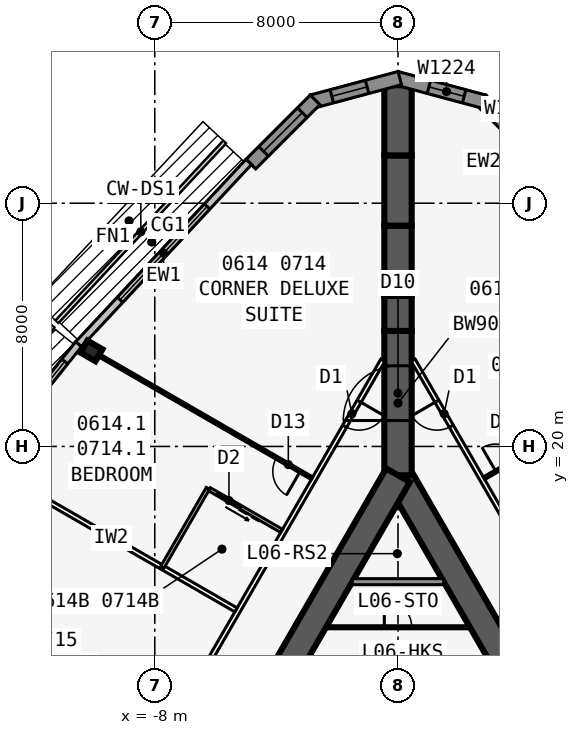
"""IFC4 building model, lengths in metres.
Left out: names, types, materials, properties, quantities, classifications, styles, units other than length and angle.
Written with IfcOpenShell. Run it as: python <this file> out.ifc"""

import sys

from ifc_helpers import new_model, si_unit, direction, frame, frame_2d, origin, origin_2d, place, context, subcontext, project, spatial, polyline, rectangle, i_section, outline, extrude, element, fill, save


model = new_model("IFC4")
c1 = context("Model", 3, precision=1e-05, world=origin(), true_north=direction((0.0, 1.0)))
c2 = subcontext(c1, "Body", "Model", "MODEL_VIEW")
j1 = project(units=[si_unit("LENGTHUNIT", "METRE"), si_unit("PLANEANGLEUNIT", "RADIAN")], contexts=[c1])
p1 = place(None, origin())
s1 = spatial("IfcSite", under=j1, at=p1, CompositionType="ELEMENT")
p2 = place(p1, origin())
s2 = spatial("IfcBuilding", under=s1, at=p2, CompositionType="ELEMENT")
p3 = place(p2, frame((0.0, 0.0, 31.9)))
s3 = spatial("IfcBuildingStorey", under=s2, at=p3, CompositionType="ELEMENT", Elevation=31.9)
p4 = place(p3, frame((16.5, -9.526, 0.0), z_axis=(0.0, 0.0, 1.0), x_axis=(-0.499999749417, 0.866025548458, 0.0)))
e1 = element("IfcWall", 1, at=p4, inside=s3, PredefinedType="SHEAR", context=c2, shape_type="SweptSolid", body=[
    extrude(rectangle(XDim=33.0, YDim=0.9, at=frame_2d((16.5, 0.0))), origin(), (0.0, 0.0, 1.0), 3.4),
])
p5 = place(p4, frame((14.15, 0.0, 0.0)))
e2 = element("IfcOpeningElement", 2, at=p5, cuts=e1, PredefinedType="OPENING", context=c2, shape_type="SweptSolid", body=[
    extrude(rectangle(XDim=1.8, YDim=2.13, at=frame_2d((0.9, 1.065))), frame((0.0, 0.46, 0.0), z_axis=(0.0, -1.0, 0.0), x_axis=(1.0, 0.0, 0.0)), (0.0, 0.0, 1.0), 0.92),
])
p6 = place(p4, frame((12.6, 0.0, 0.0)))
e3 = element("IfcOpeningElement", 3, at=p6, cuts=e1, PredefinedType="OPENING", context=c2, shape_type="SweptSolid", body=[
    extrude(rectangle(XDim=1.0, YDim=2.13, at=frame_2d((0.5, 1.065))), frame((0.0, 0.46, 0.0), z_axis=(0.0, -1.0, 0.0), x_axis=(1.0, 0.0, 0.0)), (0.0, 0.0, 1.0), 0.92),
])
p7 = place(p3, frame((0.0, 19.052, 0.0), z_axis=(0.0, 0.0, 1.0), x_axis=(-0.499999749417, -0.866025548458, 0.0)))
e4 = element("IfcWall", 4, at=p7, inside=s3, PredefinedType="SHEAR", context=c2, shape_type="SweptSolid", body=[
    extrude(rectangle(XDim=33.0, YDim=0.9, at=frame_2d((16.5, 0.0))), origin(), (0.0, 0.0, 1.0), 3.4),
])
p8 = place(p7, frame((14.15, 0.0, 0.0)))
e5 = element("IfcOpeningElement", 5, at=p8, cuts=e4, PredefinedType="OPENING", context=c2, shape_type="SweptSolid", body=[
    extrude(rectangle(XDim=1.8, YDim=2.13, at=frame_2d((0.9, 1.065))), frame((0.0, 0.46, 0.0), z_axis=(0.0, -1.0, 0.0), x_axis=(1.0, 0.0, 0.0)), (0.0, 0.0, 1.0), 0.92),
])
p9 = place(p7, frame((12.6, 0.0, 0.0)))
e6 = element("IfcOpeningElement", 6, at=p9, cuts=e4, PredefinedType="OPENING", context=c2, shape_type="SweptSolid", body=[
    extrude(rectangle(XDim=1.0, YDim=2.13, at=frame_2d((0.5, 1.065))), frame((0.0, 0.46, 0.0), z_axis=(0.0, -1.0, 0.0), x_axis=(1.0, 0.0, 0.0)), (0.0, 0.0, 1.0), 0.92),
])
p10 = place(p3, frame((0.0, 19.052, 0.0), z_axis=(0.0, 0.0, 1.0), x_axis=(0.0, 1.0, 0.0)))
e7 = element("IfcWall", 7, at=p10, inside=s3, PredefinedType="SHEAR", context=c2, shape_type="SweptSolid", body=[
    extrude(rectangle(XDim=4.746, YDim=0.9, at=frame_2d((2.373, 0.0))), origin(), (0.0, 0.0, 1.0), 3.4),
])
p11 = place(p10, frame((1.8, 0.0, 0.0)))
e8 = element("IfcOpeningElement", 8, at=p11, cuts=e7, PredefinedType="OPENING", context=c2, shape_type="SweptSolid", body=[
    extrude(rectangle(XDim=1.8, YDim=2.13, at=frame_2d((0.9, 1.065))), frame((0.0, 0.46, 0.0), z_axis=(0.0, -1.0, 0.0), x_axis=(1.0, 0.0, 0.0)), (0.0, 0.0, 1.0), 0.92),
])
p12 = place(p3, frame((0.0, 23.799, 0.0), z_axis=(0.0, 0.0, 1.0), x_axis=(0.0, 1.0, 0.0)))
e9 = element("IfcWall", 9, at=p12, inside=s3, PredefinedType="SHEAR", context=c2, shape_type="SweptSolid", body=[
    extrude(rectangle(XDim=1.155, YDim=0.9, at=frame_2d((0.577, 0.0))), origin(), (0.0, 0.0, 1.0), 3.4),
])
p13 = place(p3, frame((0.0, 24.953, 0.0), z_axis=(0.0, 0.0, 1.0), x_axis=(0.0, 1.0, 0.0)))
e10 = element("IfcWall", 10, at=p13, inside=s3, PredefinedType="SHEAR", context=c2, shape_type="SweptSolid", body=[
    extrude(rectangle(XDim=2.309, YDim=0.9, at=frame_2d((1.155, 0.0))), origin(), (0.0, 0.0, 1.0), 3.4),
])
p14 = place(p3, frame((0.0, 27.263, 0.0), z_axis=(0.0, 0.0, 1.0), x_axis=(0.0, 1.0, 0.0)))
e11 = element("IfcWall", 11, at=p14, inside=s3, PredefinedType="SHEAR", context=c2, shape_type="SweptSolid", body=[
    extrude(rectangle(XDim=2.31, YDim=0.9, at=frame_2d((1.155, 0.0))), origin(), (0.0, 0.0, 1.0), 3.4),
])
p15 = place(p3, frame((0.0, 29.572, 0.0), z_axis=(0.0, 0.0, 1.0), x_axis=(0.0, 1.0, 0.0)))
e12 = element("IfcWall", 12, at=p15, inside=s3, PredefinedType="SHEAR", context=c2, shape_type="SweptSolid", body=[
    extrude(rectangle(XDim=2.309, YDim=0.9, at=frame_2d((1.155, 0.0))), origin(), (0.0, 0.0, 1.0), 3.4),
])
p16 = place(p3, frame((-10.083, 23.142, 0.0), z_axis=(0.0, 0.0, 1.0), x_axis=(-0.5, -0.866025403784, 0.0)))
e13 = element("IfcColumn", 13, at=p16, inside=s3, PredefinedType="COLUMN", context=c2, shape_type="SweptSolid", body=[
    extrude(i_section(OverallWidth=0.455, OverallDepth=0.569, WebThickness=0.078, FlangeThickness=0.125, at=origin_2d()), origin(), (0.0, 0.0, 1.0), 3.4),
])
p17 = place(p3, frame((4.841, 29.286, 0.0), z_axis=(0.0, 0.0, 1.0), x_axis=(-0.707106781187, 0.707106781187, 0.0)))
e14 = element("IfcWall", 14, at=p17, inside=s3, PredefinedType="SOLIDWALL", context=c2, shape_type="SweptSolid", body=[
    extrude(rectangle(XDim=2.988, YDim=0.45, at=frame_2d((1.494, 0.0))), origin(), (0.0, 0.0, 1.0), 3.235),
])
p18 = place(p17, frame((0.594, 0.0, 0.45)))
e15 = element("IfcOpeningElement", 15, at=p18, cuts=e14, PredefinedType="OPENING", context=c2, shape_type="SweptSolid", body=[
    extrude(rectangle(XDim=1.8, YDim=2.4, at=frame_2d((0.9, 1.2))), frame((0.0, 0.235, 0.0), z_axis=(0.0, -1.0, 0.0), x_axis=(1.0, 0.0, 0.0)), (0.0, 0.0, 1.0), 0.47),
])
p19 = place(p3, frame((2.829, 31.341, 0.0), z_axis=(0.0, 0.0, 1.0), x_axis=(-0.965930548995, 0.258801419081, 0.0)))
e16 = element("IfcWall", 16, at=p19, inside=s3, PredefinedType="SOLIDWALL", context=c2, shape_type="SweptSolid", body=[
    extrude(outline(polyline([(2.989, 0.225), (2.929, 0.225), (2.438, 0.093), (2.402, 0.225), (0.0, 0.225), (0.0, -0.225), (2.989, -0.225), (2.989, 0.225)])), origin(), (0.0, 0.0, 1.0), 3.235),
])
p20 = place(p19, frame((0.676, 0.0, 0.45)))
e17 = element("IfcOpeningElement", 17, at=p20, cuts=e16, PredefinedType="OPENING", context=c2, shape_type="SweptSolid", body=[
    extrude(rectangle(XDim=1.2, YDim=2.4, at=frame_2d((0.6, 1.2))), frame((0.0, 0.235, 0.0), z_axis=(0.0, -1.0, 0.0), x_axis=(1.0, 0.0, 0.0)), (0.0, 0.0, 1.0), 0.47),
])
p21 = place(p3, frame((0.058, 32.114, 0.0), z_axis=(0.0, 0.0, 1.0), x_axis=(-0.965930548995, -0.258801419081, 0.0)))
e18 = element("IfcWall", 18, at=p21, inside=s3, PredefinedType="SOLIDWALL", context=c2, shape_type="SweptSolid", body=[
    extrude(outline(polyline([(2.989, 0.225), (0.586, 0.225), (0.551, 0.093), (0.059, 0.225), (0.0, 0.225), (0.0, -0.225), (2.989, -0.225), (2.989, 0.225)])), origin(), (0.0, 0.0, 1.0), 3.235),
])
p22 = place(p21, frame((1.113, 0.0, 0.45)))
e19 = element("IfcOpeningElement", 19, at=p22, cuts=e18, PredefinedType="OPENING", context=c2, shape_type="SweptSolid", body=[
    extrude(rectangle(XDim=1.2, YDim=2.4, at=frame_2d((0.6, 1.2))), frame((0.0, 0.235, 0.0), z_axis=(0.0, -1.0, 0.0), x_axis=(1.0, 0.0, 0.0)), (0.0, 0.0, 1.0), 0.47),
])
p23 = place(p3, frame((-2.728, 31.399, 0.0), z_axis=(0.0, 0.0, 1.0), x_axis=(-0.707106781187, -0.707106781187, 0.0)))
e20 = element("IfcWall", 20, at=p23, inside=s3, PredefinedType="SOLIDWALL", context=c2, shape_type="SweptSolid", body=[
    extrude(rectangle(XDim=2.988, YDim=0.45, at=frame_2d((1.494, 0.0))), origin(), (0.0, 0.0, 1.0), 3.235),
])
p24 = place(p23, frame((0.594, 0.0, 0.45)))
e21 = element("IfcOpeningElement", 21, at=p24, cuts=e20, PredefinedType="OPENING", context=c2, shape_type="SweptSolid", body=[
    extrude(rectangle(XDim=1.8, YDim=2.4, at=frame_2d((0.9, 1.2))), frame((0.0, 0.235, 0.0), z_axis=(0.0, -1.0, 0.0), x_axis=(1.0, 0.0, 0.0)), (0.0, 0.0, 1.0), 0.47),
])
p25 = place(p3, frame((-4.909, 29.36, 0.0), z_axis=(0.0, 0.0, 1.0), x_axis=(-0.682289646561, -0.731081964075, 0.0)))
e22 = element("IfcWall", 22, at=p25, inside=s3, PredefinedType="STANDARD", context=c2, shape_type="SweptSolid", body=[
    extrude(rectangle(XDim=8.211, YDim=0.25, at=frame_2d((4.105, 0.0))), origin(), (0.0, 0.0, 1.0), 3.235),
])
p26 = place(p25, frame((2.006, 0.0, 0.45)))
e23 = element("IfcOpeningElement", 23, at=p26, cuts=e22, PredefinedType="OPENING", context=c2, shape_type="SweptSolid", body=[
    extrude(rectangle(XDim=4.2, YDim=2.4, at=frame_2d((2.1, 1.2))), frame((0.0, 0.135, 0.0), z_axis=(0.0, -1.0, 0.0), x_axis=(1.0, 0.0, 0.0)), (0.0, 0.0, 1.0), 0.27),
])
p27 = place(p3, frame((-10.505, 23.364, 0.0), z_axis=(0.0, 0.0, 1.0), x_axis=(-0.624594965756, -0.780948864364, 0.0)))
e24 = element("IfcWall", 24, at=p27, inside=s3, PredefinedType="STANDARD", context=c2, shape_type="SweptSolid", body=[
    extrude(rectangle(XDim=5.058, YDim=0.25, at=frame_2d((2.529, 0.0))), origin(), (0.0, 0.0, 1.0), 3.235),
])
p28 = place(p27, frame((0.729, 0.0, 0.45)))
e25 = element("IfcOpeningElement", 25, at=p28, cuts=e24, PredefinedType="OPENING", context=c2, shape_type="SweptSolid", body=[
    extrude(rectangle(XDim=3.6, YDim=2.4, at=frame_2d((1.8, 1.2))), frame((0.0, 0.135, 0.0), z_axis=(0.0, -1.0, 0.0), x_axis=(1.0, 0.0, 0.0)), (0.0, 0.0, 1.0), 0.27),
])
p29 = place(p3, frame((20.027, -10.985, 0.0), z_axis=(0.0, 0.0, 1.0), x_axis=(-0.500001677587, 0.866024435227, 0.0)))
e26 = element("IfcWall", 26, at=p29, inside=s3, PredefinedType="PARTITIONING", context=c2, shape_type="SweptSolid", body=[
    extrude(rectangle(XDim=39.054, YDim=0.15, at=frame_2d((19.527, 0.0))), origin(), (0.0, 0.0, 1.0), 3.235),
])
p30 = place(p29, frame((0.352, 0.0, 0.0)))
e27 = element("IfcOpeningElement", 27, at=p30, cuts=e26, PredefinedType="OPENING", context=c2, shape_type="SweptSolid", body=[
    extrude(rectangle(XDim=0.95, YDim=2.13, at=frame_2d((0.475, 1.065))), frame((0.0, 0.085, 0.0), z_axis=(0.0, -1.0, 0.0), x_axis=(1.0, 0.0, 0.0)), (0.0, 0.0, 1.0), 0.17),
])
p31 = place(p29, frame((5.952, 0.0, 0.0)))
e28 = element("IfcOpeningElement", 28, at=p31, cuts=e26, PredefinedType="OPENING", context=c2, shape_type="SweptSolid", body=[
    extrude(rectangle(XDim=0.95, YDim=2.13, at=frame_2d((0.475, 1.065))), frame((0.0, 0.085, 0.0), z_axis=(0.0, -1.0, 0.0), x_axis=(1.0, 0.0, 0.0)), (0.0, 0.0, 1.0), 0.17),
])
p32 = place(p29, frame((12.152, 0.0, 0.0)))
e29 = element("IfcOpeningElement", 29, at=p32, cuts=e26, PredefinedType="OPENING", context=c2, shape_type="SweptSolid", body=[
    extrude(rectangle(XDim=0.95, YDim=2.13, at=frame_2d((0.475, 1.065))), frame((0.0, 0.085, 0.0), z_axis=(0.0, -1.0, 0.0), x_axis=(1.0, 0.0, 0.0)), (0.0, 0.0, 1.0), 0.17),
])
p33 = place(p29, frame((15.952, 0.0, 0.0)))
e30 = element("IfcOpeningElement", 30, at=p33, cuts=e26, PredefinedType="OPENING", context=c2, shape_type="SweptSolid", body=[
    extrude(rectangle(XDim=0.95, YDim=2.13, at=frame_2d((0.475, 1.065))), frame((0.0, 0.085, 0.0), z_axis=(0.0, -1.0, 0.0), x_axis=(1.0, 0.0, 0.0)), (0.0, 0.0, 1.0), 0.17),
])
p34 = place(p29, frame((22.152, 0.0, 0.0)))
e31 = element("IfcOpeningElement", 31, at=p34, cuts=e26, PredefinedType="OPENING", context=c2, shape_type="SweptSolid", body=[
    extrude(rectangle(XDim=0.95, YDim=2.13, at=frame_2d((0.475, 1.065))), frame((0.0, 0.085, 0.0), z_axis=(0.0, -1.0, 0.0), x_axis=(1.0, 0.0, 0.0)), (0.0, 0.0, 1.0), 0.17),
])
p35 = place(p29, frame((25.952, 0.0, 0.0)))
e32 = element("IfcOpeningElement", 32, at=p35, cuts=e26, PredefinedType="OPENING", context=c2, shape_type="SweptSolid", body=[
    extrude(rectangle(XDim=0.95, YDim=2.13, at=frame_2d((0.475, 1.065))), frame((0.0, 0.085, 0.0), z_axis=(0.0, -1.0, 0.0), x_axis=(1.0, 0.0, 0.0)), (0.0, 0.0, 1.0), 0.17),
])
p36 = place(p29, frame((36.546, 0.0, 0.0)))
e33 = element("IfcOpeningElement", 33, at=p36, cuts=e26, PredefinedType="OPENING", context=c2, shape_type="SweptSolid", body=[
    extrude(rectangle(XDim=0.95, YDim=2.13, at=frame_2d((0.475, 1.065))), frame((0.0, 0.085, 0.0), z_axis=(0.0, -1.0, 0.0), x_axis=(1.0, 0.0, 0.0)), (0.0, 0.0, 1.0), 0.17),
])
p37 = place(p3, frame((2.829, 18.954, 0.0), z_axis=(0.0, 0.0, 1.0), x_axis=(0.866020536561, 0.500008430184, 0.0)))
e34 = element("IfcWall", 34, at=p37, inside=s3, PredefinedType="PARTITIONING", context=c2, shape_type="SweptSolid", body=[
    extrude(rectangle(XDim=8.72, YDim=0.1, at=frame_2d((4.36, 0.0))), origin(), (0.0, 0.0, 1.0), 2.389),
])
p38 = place(p37, frame((0.45, 0.0, 0.0)))
e35 = element("IfcOpeningElement", 35, at=p38, cuts=e34, PredefinedType="OPENING", context=c2, shape_type="SweptSolid", body=[
    extrude(rectangle(XDim=0.9, YDim=2.13, at=frame_2d((0.45, 1.065))), frame((0.0, 0.06, 0.0), z_axis=(0.0, -1.0, 0.0), x_axis=(1.0, 0.0, 0.0)), (0.0, 0.0, 1.0), 0.12),
])
p39 = place(p3, frame((-0.5, 22.836, 0.0), z_axis=(0.0, 0.0, 1.0), x_axis=(-0.500001677587, -0.866024435227, 0.0)))
e36 = element("IfcWall", 36, at=p39, inside=s3, PredefinedType="PARTITIONING", context=c2, shape_type="SweptSolid", body=[
    extrude(rectangle(XDim=39.054, YDim=0.15, at=frame_2d((19.527, 0.0))), origin(), (0.0, 0.0, 1.0), 3.235),
])
p40 = place(p39, frame((1.558, 0.0, 0.0)))
e37 = element("IfcOpeningElement", 37, at=p40, cuts=e36, PredefinedType="OPENING", context=c2, shape_type="SweptSolid", body=[
    extrude(rectangle(XDim=0.95, YDim=2.13, at=frame_2d((0.475, 1.065))), frame((0.0, 0.085, 0.0), z_axis=(0.0, -1.0, 0.0), x_axis=(1.0, 0.0, 0.0)), (0.0, 0.0, 1.0), 0.17),
])
p41 = place(p39, frame((15.352, 0.0, 0.0)))
e38 = element("IfcOpeningElement", 38, at=p41, cuts=e36, PredefinedType="OPENING", context=c2, shape_type="SweptSolid", body=[
    extrude(rectangle(XDim=0.95, YDim=2.13, at=frame_2d((0.475, 1.065))), frame((0.0, 0.085, 0.0), z_axis=(0.0, -1.0, 0.0), x_axis=(1.0, 0.0, 0.0)), (0.0, 0.0, 1.0), 0.17),
])
p42 = place(p39, frame((22.752, 0.0, 0.0)))
e39 = element("IfcOpeningElement", 39, at=p42, cuts=e36, PredefinedType="OPENING", context=c2, shape_type="SweptSolid", body=[
    extrude(rectangle(XDim=0.95, YDim=2.13, at=frame_2d((0.475, 1.065))), frame((0.0, 0.085, 0.0), z_axis=(0.0, -1.0, 0.0), x_axis=(1.0, 0.0, 0.0)), (0.0, 0.0, 1.0), 0.17),
])
p43 = place(p39, frame((30.952, 0.0, 0.0)))
e40 = element("IfcOpeningElement", 40, at=p43, cuts=e36, PredefinedType="OPENING", context=c2, shape_type="SweptSolid", body=[
    extrude(rectangle(XDim=0.95, YDim=2.13, at=frame_2d((0.475, 1.065))), frame((0.0, 0.085, 0.0), z_axis=(0.0, -1.0, 0.0), x_axis=(1.0, 0.0, 0.0)), (0.0, 0.0, 1.0), 0.17),
])
p44 = place(p39, frame((37.752, 0.0, 0.0)))
e41 = element("IfcOpeningElement", 41, at=p44, cuts=e36, PredefinedType="OPENING", context=c2, shape_type="SweptSolid", body=[
    extrude(rectangle(XDim=0.95, YDim=2.13, at=frame_2d((0.475, 1.065))), frame((0.0, 0.085, 0.0), z_axis=(0.0, -1.0, 0.0), x_axis=(1.0, 0.0, 0.0)), (0.0, 0.0, 1.0), 0.17),
])
p45 = place(p3, frame((-2.829, 18.954, 0.0), z_axis=(0.0, 0.0, 1.0), x_axis=(-0.866020536561, 0.500008430184, 0.0)))
e42 = element("IfcWall", 42, at=p45, inside=s3, PredefinedType="PARTITIONING", context=c2, shape_type="SweptSolid", body=[
    extrude(rectangle(XDim=8.72, YDim=0.1, at=frame_2d((4.36, 0.0))), origin(), (0.0, 0.0, 1.0), 2.389),
])
p46 = place(p45, frame((0.45, 0.0, 0.0)))
e43 = element("IfcOpeningElement", 43, at=p46, cuts=e42, PredefinedType="OPENING", context=c2, shape_type="SweptSolid", body=[
    extrude(rectangle(XDim=0.9, YDim=2.13, at=frame_2d((0.45, 1.065))), frame((0.0, 0.06, 0.0), z_axis=(0.0, -1.0, 0.0), x_axis=(1.0, 0.0, 0.0)), (0.0, 0.0, 1.0), 0.12),
])
p47 = place(p3, frame((-5.329, 14.623, 0.0), z_axis=(0.0, 0.0, 1.0), x_axis=(-0.866018409083, 0.500012114982, 0.0)))
e44 = element("IfcWall", 44, at=p47, inside=s3, PredefinedType="PARTITIONING", context=c2, shape_type="SweptSolid", body=[
    extrude(rectangle(XDim=9.485, YDim=0.15, at=frame_2d((4.742, 0.0))), origin(), (0.0, 0.0, 1.0), 2.389),
])
p48 = place(p3, frame((-6.253, 18.622, 0.0), z_axis=(0.0, 0.0, 1.0), x_axis=(-0.499990139034, -0.866031096941, 0.0)))
e45 = element("IfcWall", 45, at=p48, inside=s3, PredefinedType="PLUMBINGWALL", context=c2, shape_type="SweptSolid", body=[
    extrude(rectangle(XDim=3.0, YDim=0.12, at=frame_2d((1.5, 0.0))), origin(), (0.0, 0.0, 1.0), 3.235),
])
p49 = place(p3, frame((-3.829, 17.221, 0.0), z_axis=(0.0, 0.0, 1.0), x_axis=(-0.865997131366, 0.500048966069, 0.0)))
e46 = element("IfcWall", 46, at=p49, inside=s3, PredefinedType="PLUMBINGWALL", context=c2, shape_type="SweptSolid", body=[
    extrude(rectangle(XDim=2.74, YDim=0.12, at=frame_2d((1.37, 0.0))), origin(), (0.0, 0.0, 1.0), 3.235),
])
p50 = place(p49, frame((1.55, 0.0, 0.0)))
e47 = element("IfcOpeningElement", 47, at=p50, cuts=e46, PredefinedType="OPENING", context=c2, shape_type="SweptSolid", body=[
    extrude(rectangle(XDim=0.9, YDim=2.13, at=frame_2d((0.45, 1.065))), frame((0.0, 0.07, 0.0), z_axis=(0.0, -1.0, 0.0), x_axis=(1.0, 0.0, 0.0)), (0.0, 0.0, 1.0), 0.14),
])
p51 = place(p3, frame((-1.501, 15.552, 0.0), z_axis=(0.0, 0.0, 1.0), x_axis=(1.0, 0.0, 0.0)))
e48 = element("IfcWall", 48, at=p51, inside=s3, PredefinedType="SOLIDWALL", context=c2, shape_type="SweptSolid", body=[
    extrude(rectangle(XDim=3.002, YDim=0.2, at=frame_2d((1.501, 0.0))), origin(), (0.0, 0.0, 1.0), 3.235),
])
p52 = place(p3, frame((-2.367, 14.052, 0.0), z_axis=(0.0, 0.0, 1.0), x_axis=(1.0, 0.0, 0.0)))
e49 = element("IfcWall", 49, at=p52, inside=s3, PredefinedType="PARTITIONING", context=c2, shape_type="SweptSolid", body=[
    extrude(rectangle(XDim=4.734, YDim=0.1, at=frame_2d((2.367, 0.0))), origin(), (0.0, 0.0, 1.0), 3.235),
])
p53 = place(p52, frame((1.917, 0.0, 0.0)))
e50 = element("IfcOpeningElement", 50, at=p53, cuts=e49, PredefinedType="OPENING", context=c2, shape_type="SweptSolid", body=[
    extrude(rectangle(XDim=0.9, YDim=2.13, at=frame_2d((0.45, 1.065))), frame((0.0, 0.06, 0.0), z_axis=(0.0, -1.0, 0.0), x_axis=(1.0, 0.0, 0.0)), (0.0, 0.0, 1.0), 0.12),
])
p54 = place(p18, origin())
e51 = element("IfcWindow", 51, at=p54, inside=s3, PartitioningType="SINGLE_PANEL", PredefinedType="WINDOW", context=c2, shape_type="SweptSolid", body=[
    extrude(rectangle(XDim=1.8, YDim=2.4, at=frame_2d((0.9, 1.2))), frame((0.0, 0.03, 0.0), z_axis=(0.0, -1.0, 0.0), x_axis=(1.0, 0.0, 0.0)), (0.0, 0.0, 1.0), 0.06),
])
fill(e15, e51)
p55 = place(p20, origin())
e52 = element("IfcWindow", 52, at=p55, inside=s3, PartitioningType="SINGLE_PANEL", PredefinedType="WINDOW", context=c2, shape_type="SweptSolid", body=[
    extrude(rectangle(XDim=1.2, YDim=2.4, at=frame_2d((0.6, 1.2))), frame((0.0, 0.03, 0.0), z_axis=(0.0, -1.0, 0.0), x_axis=(1.0, 0.0, 0.0)), (0.0, 0.0, 1.0), 0.06),
])
fill(e17, e52)
p56 = place(p22, origin())
e53 = element("IfcWindow", 53, at=p56, inside=s3, PartitioningType="SINGLE_PANEL", PredefinedType="WINDOW", context=c2, shape_type="SweptSolid", body=[
    extrude(rectangle(XDim=1.2, YDim=2.4, at=frame_2d((0.6, 1.2))), frame((0.0, 0.03, 0.0), z_axis=(0.0, -1.0, 0.0), x_axis=(1.0, 0.0, 0.0)), (0.0, 0.0, 1.0), 0.06),
])
fill(e19, e53)
p57 = place(p24, origin())
e54 = element("IfcWindow", 54, at=p57, inside=s3, PartitioningType="SINGLE_PANEL", PredefinedType="WINDOW", context=c2, shape_type="SweptSolid", body=[
    extrude(rectangle(XDim=1.8, YDim=2.4, at=frame_2d((0.9, 1.2))), frame((0.0, 0.03, 0.0), z_axis=(0.0, -1.0, 0.0), x_axis=(1.0, 0.0, 0.0)), (0.0, 0.0, 1.0), 0.06),
])
fill(e21, e54)
p58 = place(p26, origin())
e55 = element("IfcWindow", 55, at=p58, inside=s3, PartitioningType="SINGLE_PANEL", PredefinedType="WINDOW", context=c2, shape_type="SweptSolid", body=[
    extrude(rectangle(XDim=4.2, YDim=2.4, at=frame_2d((2.1, 1.2))), frame((0.0, 0.03, 0.0), z_axis=(0.0, -1.0, 0.0), x_axis=(1.0, 0.0, 0.0)), (0.0, 0.0, 1.0), 0.06),
])
fill(e23, e55)
p59 = place(p28, origin())
e56 = element("IfcWindow", 56, at=p59, inside=s3, PartitioningType="SINGLE_PANEL", PredefinedType="WINDOW", context=c2, shape_type="SweptSolid", body=[
    extrude(rectangle(XDim=3.6, YDim=2.4, at=frame_2d((1.8, 1.2))), frame((0.0, 0.03, 0.0), z_axis=(0.0, -1.0, 0.0), x_axis=(1.0, 0.0, 0.0)), (0.0, 0.0, 1.0), 0.06),
])
fill(e25, e56)
p60 = place(p38, origin())
e57 = element("IfcDoor", 57, at=p60, inside=s3, OperationType="SINGLE_SWING_LEFT", PredefinedType="DOOR", context=c2, shape_type="SweptSolid", body=[
    extrude(rectangle(XDim=0.9, YDim=2.13, at=frame_2d((0.45, 1.065))), frame((0.0, 0.025, 0.0), z_axis=(0.0, -1.0, 0.0), x_axis=(1.0, 0.0, 0.0)), (0.0, 0.0, 1.0), 0.05),
])
fill(e35, e57)
p61 = place(p36, origin())
e58 = element("IfcDoor", 58, at=p61, inside=s3, OperationType="SINGLE_SWING_RIGHT", PredefinedType="DOOR", context=c2, shape_type="SweptSolid", body=[
    extrude(rectangle(XDim=0.95, YDim=2.13, at=frame_2d((0.475, 1.065))), frame((0.0, 0.025, 0.0), z_axis=(0.0, -1.0, 0.0), x_axis=(1.0, 0.0, 0.0)), (0.0, 0.0, 1.0), 0.05),
])
fill(e33, e58)
p62 = place(p46, origin())
e59 = element("IfcDoor", 59, at=p62, inside=s3, OperationType="SINGLE_SWING_LEFT", PredefinedType="DOOR", context=c2, shape_type="SweptSolid", body=[
    extrude(rectangle(XDim=0.9, YDim=2.13, at=frame_2d((0.45, 1.065))), frame((0.0, 0.025, 0.0), z_axis=(0.0, -1.0, 0.0), x_axis=(1.0, 0.0, 0.0)), (0.0, 0.0, 1.0), 0.05),
])
fill(e43, e59)
p63 = place(p40, origin())
e60 = element("IfcDoor", 60, at=p63, inside=s3, OperationType="SINGLE_SWING_LEFT", PredefinedType="DOOR", context=c2, shape_type="SweptSolid", body=[
    extrude(rectangle(XDim=0.95, YDim=2.13, at=frame_2d((0.475, 1.065))), frame((0.0, 0.025, 0.0), z_axis=(0.0, -1.0, 0.0), x_axis=(1.0, 0.0, 0.0)), (0.0, 0.0, 1.0), 0.05),
])
fill(e37, e60)
p64 = place(p50, origin())
e61 = element("IfcDoor", 61, at=p64, inside=s3, OperationType="SLIDING_TO_LEFT", PredefinedType="DOOR", context=c2, shape_type="SweptSolid", body=[
    extrude(rectangle(XDim=0.9, YDim=2.13, at=frame_2d((0.45, 1.065))), frame((0.0, 0.025, 0.0), z_axis=(0.0, -1.0, 0.0), x_axis=(1.0, 0.0, 0.0)), (0.0, 0.0, 1.0), 0.05),
])
fill(e47, e61)
p65 = place(p11, origin())
e62 = element("IfcDoor", 62, at=p65, inside=s3, OperationType="DOUBLE_DOOR_DOUBLE_SWING", PredefinedType="DOOR", context=c2, shape_type="SweptSolid", body=[
    extrude(rectangle(XDim=1.8, YDim=2.13, at=frame_2d((0.9, 1.065))), frame((0.0, 0.025, 0.0), z_axis=(0.0, -1.0, 0.0), x_axis=(1.0, 0.0, 0.0)), (0.0, 0.0, 1.0), 0.05),
])
fill(e8, e62)
p66 = place(p53, origin())
e63 = element("IfcDoor", 63, at=p66, inside=s3, OperationType="SINGLE_SWING_LEFT", PredefinedType="DOOR", context=c2, shape_type="SweptSolid", body=[
    extrude(rectangle(XDim=0.9, YDim=2.13, at=frame_2d((0.45, 1.065))), frame((0.0, 0.025, 0.0), z_axis=(0.0, -1.0, 0.0), x_axis=(1.0, 0.0, 0.0)), (0.0, 0.0, 1.0), 0.05),
])
fill(e50, e63)
save(model, sys.argv[1])
